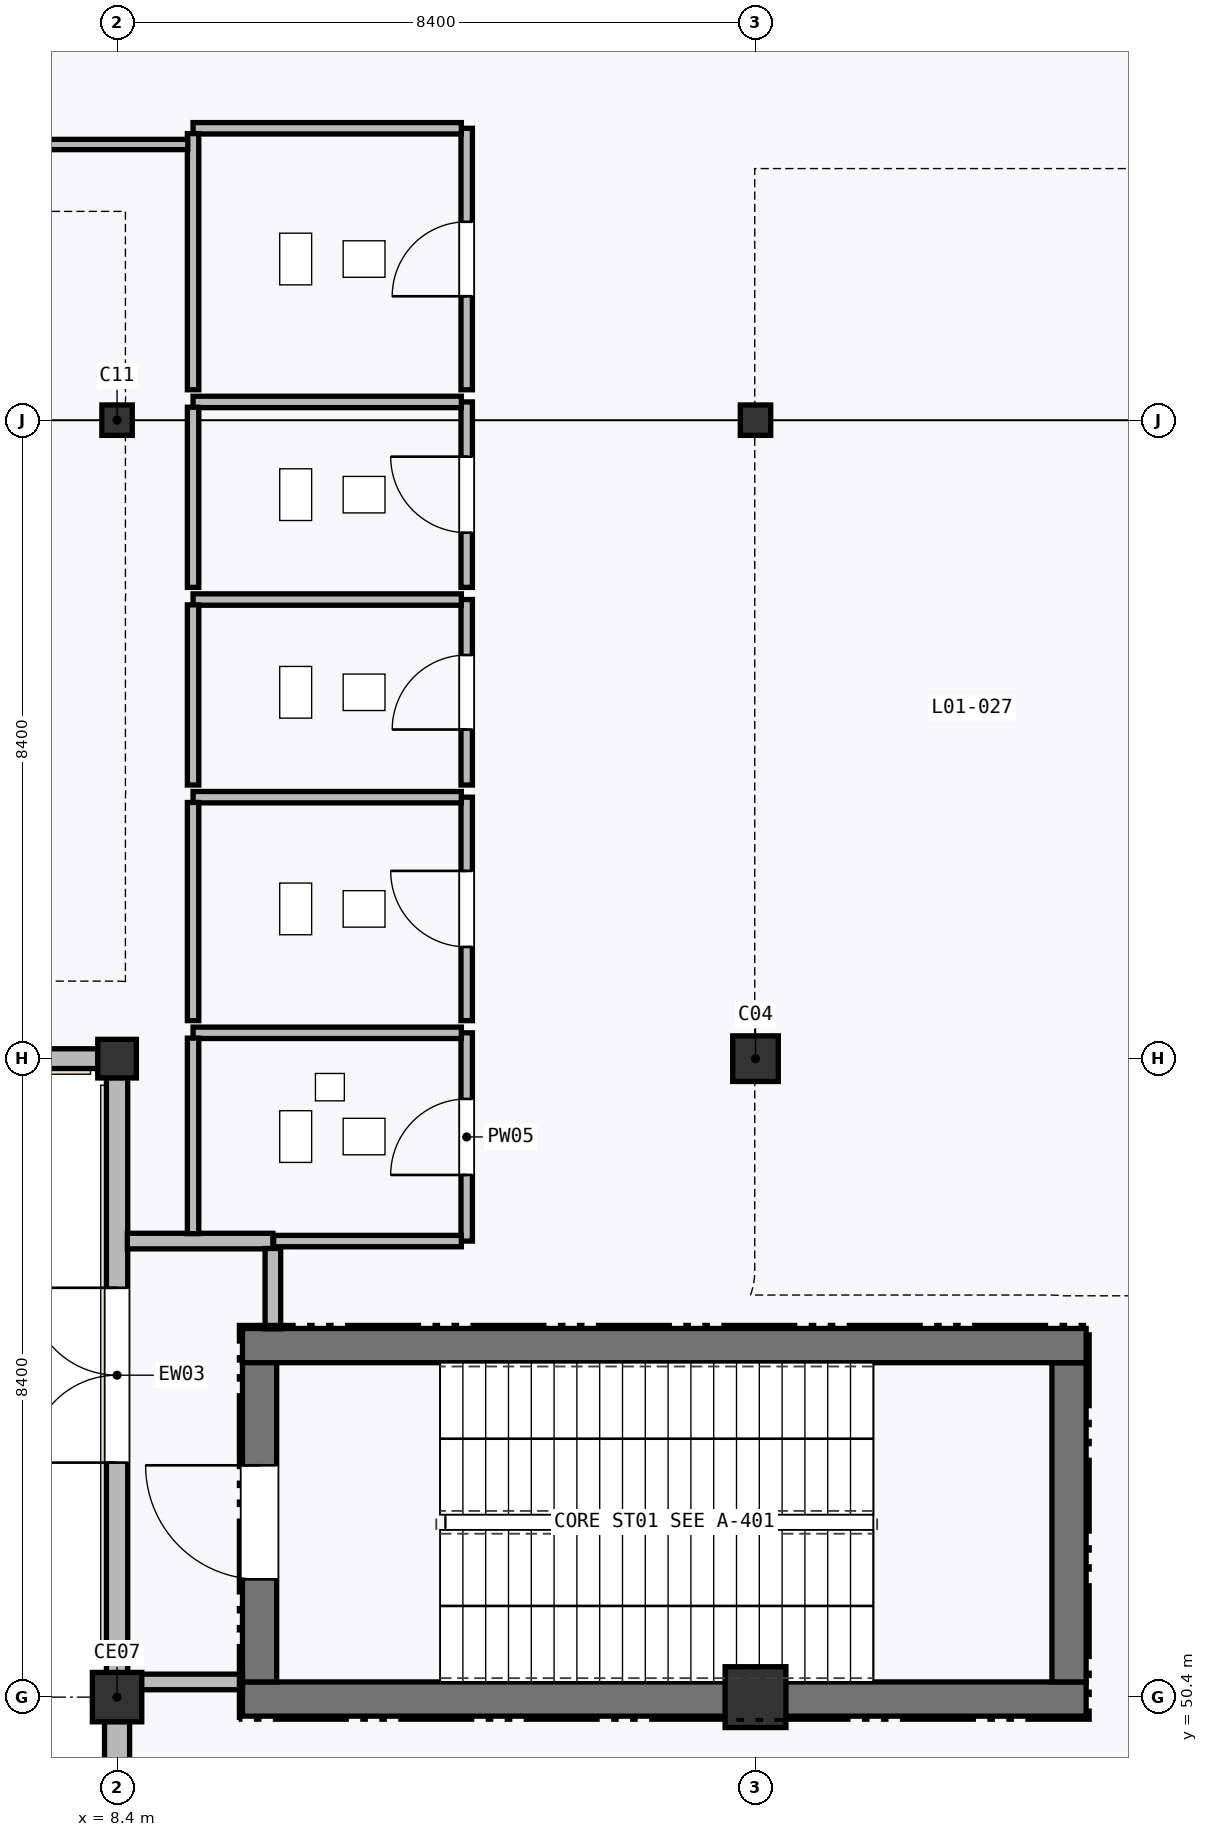
"""IFC4 building model, lengths in metres.
Left out: names, types, materials, properties, quantities, classifications, styles, units other than length and angle.
Written with IfcOpenShell. Run it as: python <this file> out.ifc"""

import sys

from ifc_helpers import new_model, si_unit, direction, frame, frame_2d, origin, origin_2d, place, context, subcontext, project, spatial, rectangle, hollow_rectangle, hollow_circle, i_section, extrude, element, fill, save


model = new_model("IFC4")
c1 = context("Model", 3, precision=1e-05, world=origin(), true_north=direction((0.0, 1.0)))
c2 = subcontext(c1, "Body", "Model", "MODEL_VIEW")
j1 = project(units=[si_unit("LENGTHUNIT", "METRE"), si_unit("PLANEANGLEUNIT", "RADIAN")], contexts=[c1])
p1 = place(None, origin())
s1 = spatial("IfcSite", under=j1, at=p1, CompositionType="ELEMENT")
p2 = place(p1, origin())
s2 = spatial("IfcBuilding", under=s1, at=p2, CompositionType="ELEMENT")
p3 = place(p2, origin())
s3 = spatial("IfcBuildingStorey", under=s2, at=p3, CompositionType="ELEMENT", Elevation=0.0)
p4 = place(p3, frame((8.4, 50.4, 0.0), z_axis=(0.0, 0.0, 1.0), x_axis=(1.0, 0.0, 0.0)))
e1 = element("IfcColumn", 1, at=p4, inside=s3, PredefinedType="COLUMN", context=c2, shape_type="SweptSolid", body=[
    extrude(rectangle(XDim=0.65, YDim=0.65, at=origin_2d()), origin(), (0.0, 0.0, 1.0), 6.0),
])
p5 = place(p3, frame((8.4, 58.8, 0.0), z_axis=(0.0, 0.0, 1.0), x_axis=(1.0, 0.0, 0.0)))
e2 = element("IfcColumn", 2, at=p5, inside=s3, PredefinedType="COLUMN", context=c2, shape_type="SweptSolid", body=[
    extrude(hollow_circle(Radius=0.254, WallThickness=0.016, at=origin_2d()), origin(), (0.0, 0.0, 1.0), 6.0),
])
p6 = place(p3, frame((8.4, 67.2, 0.0), z_axis=(0.0, 0.0, 1.0), x_axis=(1.0, 0.0, 0.0)))
e3 = element("IfcColumn", 3, at=p6, inside=s3, PredefinedType="COLUMN", context=c2, shape_type="SweptSolid", body=[
    extrude(i_section(OverallWidth=0.4, OverallDepth=0.4, WebThickness=0.013, FlangeThickness=0.021, FilletRadius=0.022, at=origin_2d()), origin(), (0.0, 0.0, 1.0), 6.0),
])
p7 = place(p3, frame((16.8, 50.4, 0.0), z_axis=(0.0, 0.0, 1.0), x_axis=(1.0, 0.0, 0.0)))
e4 = element("IfcColumn", 4, at=p7, inside=s3, PredefinedType="COLUMN", context=c2, shape_type="SweptSolid", body=[
    extrude(rectangle(XDim=0.8, YDim=0.8, at=origin_2d()), origin(), (0.0, 0.0, 1.0), 6.0),
])
p8 = place(p3, frame((16.8, 58.8, 0.0), z_axis=(0.0, 0.0, 1.0), x_axis=(1.0, 0.0, 0.0)))
e5 = element("IfcColumn", 5, at=p8, inside=s3, PredefinedType="COLUMN", context=c2, shape_type="SweptSolid", body=[
    extrude(hollow_rectangle(XDim=0.6, YDim=0.6, WallThickness=0.024, at=origin_2d()), origin(), (0.0, 0.0, 1.0), 6.0),
])
p9 = place(p3, frame((16.8, 67.2, 0.0), z_axis=(0.0, 0.0, 1.0), x_axis=(1.0, 0.0, 0.0)))
e6 = element("IfcColumn", 6, at=p9, inside=s3, PredefinedType="COLUMN", context=c2, shape_type="SweptSolid", body=[
    extrude(i_section(OverallWidth=0.4, OverallDepth=0.4, WebThickness=0.013, FlangeThickness=0.021, FilletRadius=0.022, at=origin_2d()), origin(), (0.0, 0.0, 1.0), 6.0),
])
p10 = place(p3, frame((0.0, 58.8, 0.0), z_axis=(0.0, 0.0, 1.0), x_axis=(1.0, 0.0, 0.0)))
e7 = element("IfcWall", 7, at=p10, inside=s3, PredefinedType="STANDARD", context=c2, shape_type="SweptSolid", body=[
    extrude(rectangle(XDim=8.151, YDim=0.26, at=frame_2d((4.075, 0.0))), origin(), (0.0, 0.0, 1.0), 5.231),
])
p11 = place(p10, frame((2.926, 0.0, 0.0)))
e8 = element("IfcOpeningElement", 8, at=p11, cuts=e7, PredefinedType="OPENING", context=c2, shape_type="SweptSolid", body=[
    extrude(rectangle(XDim=2.3, YDim=2.4, at=frame_2d((1.15, 1.2))), frame((0.0, 0.14, 0.0), z_axis=(0.0, -1.0, 0.0), x_axis=(1.0, 0.0, 0.0)), (0.0, 0.0, 1.0), 0.28),
])
p12 = place(p3, frame((8.4, 58.551, 0.0), z_axis=(0.0, 0.0, 1.0), x_axis=(0.0, -1.0, 0.0)))
e9 = element("IfcWall", 9, at=p12, inside=s3, PredefinedType="STANDARD", context=c2, shape_type="SweptSolid", body=[
    extrude(rectangle(XDim=7.831, YDim=0.28, at=frame_2d((3.916, 0.0))), origin(), (0.0, 0.0, 1.0), 5.231),
])
p13 = place(p12, frame((2.765, 0.0, 0.0)))
e10 = element("IfcOpeningElement", 10, at=p13, cuts=e9, PredefinedType="OPENING", context=c2, shape_type="SweptSolid", body=[
    extrude(rectangle(XDim=2.3, YDim=2.4, at=frame_2d((1.15, 1.2))), frame((0.0, 0.15, 0.0), z_axis=(0.0, -1.0, 0.0), x_axis=(1.0, 0.0, 0.0)), (0.0, 0.0, 1.0), 0.3),
])
p14 = place(p3, frame((8.4, 50.08, 0.0), z_axis=(0.0, 0.0, 1.0), x_axis=(0.0, -1.0, 0.0)))
e11 = element("IfcWall", 11, at=p14, inside=s3, PredefinedType="STANDARD", context=c2, shape_type="SweptSolid", body=[
    extrude(rectangle(XDim=7.735, YDim=0.33, at=frame_2d((3.868, 0.0))), origin(), (0.0, 0.0, 1.0), 5.231),
])
p15 = place(p14, frame((2.08, 0.0, 0.0)))
e12 = element("IfcOpeningElement", 12, at=p15, cuts=e11, PredefinedType="OPENING", context=c2, shape_type="SweptSolid", body=[
    extrude(rectangle(XDim=4.8, YDim=3.4, at=frame_2d((2.4, 1.7))), frame((0.0, 0.175, 0.0), z_axis=(0.0, -1.0, 0.0), x_axis=(1.0, 0.0, 0.0)), (0.0, 0.0, 1.0), 0.35),
])
p16 = place(p3, frame((10.05, 50.375, 0.0), z_axis=(0.0, 0.0, 1.0), x_axis=(1.0, 0.0, 0.0)))
e13 = element("IfcWall", 13, at=p16, inside=s3, PredefinedType="SHEAR", context=c2, shape_type="SweptSolid", body=[
    extrude(rectangle(XDim=11.1, YDim=0.45, at=frame_2d((5.55, 0.0))), origin(), (0.0, 0.0, 1.0), 5.745),
])
p17 = place(p3, frame((20.925, 50.6, 0.0), z_axis=(0.0, 0.0, 1.0), x_axis=(0.0, 1.0, 0.0)))
e14 = element("IfcWall", 14, at=p17, inside=s3, PredefinedType="SHEAR", context=c2, shape_type="SweptSolid", body=[
    extrude(rectangle(XDim=4.2, YDim=0.45, at=frame_2d((2.1, 0.0))), origin(), (0.0, 0.0, 1.0), 5.745),
])
p18 = place(p3, frame((21.15, 55.025, 0.0), z_axis=(0.0, 0.0, 1.0), x_axis=(-1.0, 0.0, 0.0)))
e15 = element("IfcWall", 15, at=p18, inside=s3, PredefinedType="SHEAR", context=c2, shape_type="SweptSolid", body=[
    extrude(rectangle(XDim=11.1, YDim=0.45, at=frame_2d((5.55, 0.0))), origin(), (0.0, 0.0, 1.0), 5.745),
])
p19 = place(p3, frame((10.275, 54.8, 0.0), z_axis=(0.0, 0.0, 1.0), x_axis=(0.0, -1.0, 0.0)))
e16 = element("IfcWall", 16, at=p19, inside=s3, PredefinedType="SHEAR", context=c2, shape_type="SweptSolid", body=[
    extrude(rectangle(XDim=4.2, YDim=0.45, at=frame_2d((2.1, 0.0))), origin(), (0.0, 0.0, 1.0), 5.745),
])
p20 = place(p19, frame((1.35, 0.0, 0.0)))
e17 = element("IfcOpeningElement", 17, at=p20, cuts=e16, PredefinedType="OPENING", context=c2, shape_type="SweptSolid", body=[
    extrude(rectangle(XDim=1.5, YDim=2.15, at=frame_2d((0.75, 1.075))), frame((0.0, 0.235, 0.0), z_axis=(0.0, -1.0, 0.0), x_axis=(1.0, 0.0, 0.0)), (0.0, 0.0, 1.0), 0.47),
])
p21 = place(p3, frame((10.45, 56.4, 0.0), z_axis=(0.0, 0.0, 1.0), x_axis=(-1.0, 0.0, 0.0)))
e18 = element("IfcWall", 18, at=p21, inside=s3, PredefinedType="PARTITIONING", context=c2, shape_type="SweptSolid", body=[
    extrude(rectangle(XDim=1.915, YDim=0.205, at=frame_2d((0.958, 0.0))), origin(), (0.0, 0.0, 1.0), 5.745),
])
p22 = place(p3, frame((8.32, 50.6, 0.0), z_axis=(0.0, 0.0, 1.0), x_axis=(1.0, 0.0, 0.0)))
e19 = element("IfcWall", 19, at=p22, inside=s3, PredefinedType="PARTITIONING", context=c2, shape_type="SweptSolid", body=[
    extrude(rectangle(XDim=1.73, YDim=0.205, at=frame_2d((0.865, 0.0))), origin(), (0.0, 0.0, 1.0), 5.143),
])
p23 = place(p3, frame((10.45, 55.245, 0.0), z_axis=(0.0, 0.0, 1.0), x_axis=(0.0, 1.0, 0.0)))
e20 = element("IfcWall", 20, at=p23, inside=s3, PredefinedType="PARTITIONING", context=c2, shape_type="SweptSolid", body=[
    extrude(rectangle(XDim=1.057, YDim=0.205, at=frame_2d((0.529, 0.0))), origin(), (0.0, 0.0, 1.0), 5.745),
])
p24 = place(p3, frame((13.0, 56.4, 0.0), z_axis=(0.0, 0.0, 1.0), x_axis=(0.0, 1.0, 0.0)))
e21 = element("IfcWall", 21, at=p24, inside=s3, PredefinedType="PARTITIONING", context=c2, shape_type="SweptSolid", body=[
    extrude(rectangle(XDim=2.74, YDim=0.15, at=frame_2d((1.37, 0.0))), origin(), (0.0, 0.0, 1.0), 5.745),
])
p25 = place(p24, frame((0.87, 0.0, 0.0)))
e22 = element("IfcOpeningElement", 22, at=p25, cuts=e21, PredefinedType="OPENING", context=c2, shape_type="SweptSolid", body=[
    extrude(rectangle(XDim=1.0, YDim=2.1, at=frame_2d((0.5, 1.05))), frame((0.0, 0.085, 0.0), z_axis=(0.0, -1.0, 0.0), x_axis=(1.0, 0.0, 0.0)), (0.0, 0.0, 1.0), 0.17),
])
p26 = place(p3, frame((10.46, 56.4, 0.0), z_axis=(0.0, 0.0, 1.0), x_axis=(1.0, 0.0, 0.0)))
e23 = element("IfcWall", 23, at=p26, inside=s3, PredefinedType="PARTITIONING", context=c2, shape_type="SweptSolid", body=[
    extrude(rectangle(XDim=2.47, YDim=0.15, at=frame_2d((1.235, 0.0))), origin(), (0.0, 0.0, 1.0), 5.745),
])
p27 = place(p3, frame((12.93, 59.14, 0.0), z_axis=(0.0, 0.0, 1.0), x_axis=(-1.0, 0.0, 0.0)))
e24 = element("IfcWall", 24, at=p27, inside=s3, PredefinedType="PARTITIONING", context=c2, shape_type="SweptSolid", body=[
    extrude(rectangle(XDim=3.53, YDim=0.15, at=frame_2d((1.765, 0.0))), origin(), (0.0, 0.0, 1.0), 4.825),
])
p28 = place(p3, frame((9.4, 59.07, 0.0), z_axis=(0.0, 0.0, 1.0), x_axis=(0.0, -1.0, 0.0)))
e25 = element("IfcWall", 25, at=p28, inside=s3, PredefinedType="PARTITIONING", context=c2, shape_type="SweptSolid", body=[
    extrude(rectangle(XDim=2.573, YDim=0.15, at=frame_2d((1.286, 0.0))), origin(), (0.0, 0.0, 1.0), 5.745),
])
p29 = place(p3, frame((13.0, 59.3, 0.0), z_axis=(0.0, 0.0, 1.0), x_axis=(0.0, 1.0, 0.0)))
e26 = element("IfcWall", 26, at=p29, inside=s3, PredefinedType="PARTITIONING", context=c2, shape_type="SweptSolid", body=[
    extrude(rectangle(XDim=2.94, YDim=0.15, at=frame_2d((1.47, 0.0))), origin(), (0.0, 0.0, 1.0), 5.745),
])
p30 = place(p29, frame((0.97, 0.0, 0.0)))
e27 = element("IfcOpeningElement", 27, at=p30, cuts=e26, PredefinedType="OPENING", context=c2, shape_type="SweptSolid", body=[
    extrude(rectangle(XDim=1.0, YDim=2.1, at=frame_2d((0.5, 1.05))), frame((0.0, 0.085, 0.0), z_axis=(0.0, -1.0, 0.0), x_axis=(1.0, 0.0, 0.0)), (0.0, 0.0, 1.0), 0.17),
])
p31 = place(p3, frame((12.93, 62.24, 0.0), z_axis=(0.0, 0.0, 1.0), x_axis=(-1.0, 0.0, 0.0)))
e28 = element("IfcWall", 28, at=p31, inside=s3, PredefinedType="PARTITIONING", context=c2, shape_type="SweptSolid", body=[
    extrude(rectangle(XDim=3.53, YDim=0.15, at=frame_2d((1.765, 0.0))), origin(), (0.0, 0.0, 1.0), 5.745),
])
p32 = place(p3, frame((9.4, 62.17, 0.0), z_axis=(0.0, 0.0, 1.0), x_axis=(0.0, -1.0, 0.0)))
e29 = element("IfcWall", 29, at=p32, inside=s3, PredefinedType="PARTITIONING", context=c2, shape_type="SweptSolid", body=[
    extrude(rectangle(XDim=2.87, YDim=0.15, at=frame_2d((1.435, 0.0))), origin(), (0.0, 0.0, 1.0), 5.745),
])
p33 = place(p3, frame((13.0, 62.4, 0.0), z_axis=(0.0, 0.0, 1.0), x_axis=(0.0, 1.0, 0.0)))
e30 = element("IfcWall", 30, at=p33, inside=s3, PredefinedType="PARTITIONING", context=c2, shape_type="SweptSolid", body=[
    extrude(rectangle(XDim=2.44, YDim=0.15, at=frame_2d((1.22, 0.0))), origin(), (0.0, 0.0, 1.0), 5.745),
])
p34 = place(p33, frame((0.73, 0.0, 0.0)))
e31 = element("IfcOpeningElement", 31, at=p34, cuts=e30, PredefinedType="OPENING", context=c2, shape_type="SweptSolid", body=[
    extrude(rectangle(XDim=0.98, YDim=2.1, at=frame_2d((0.49, 1.05))), frame((0.0, 0.085, 0.0), z_axis=(0.0, -1.0, 0.0), x_axis=(1.0, 0.0, 0.0)), (0.0, 0.0, 1.0), 0.17),
])
p35 = place(p3, frame((12.93, 64.84, 0.0), z_axis=(0.0, 0.0, 1.0), x_axis=(-1.0, 0.0, 0.0)))
e32 = element("IfcWall", 32, at=p35, inside=s3, PredefinedType="PARTITIONING", context=c2, shape_type="SweptSolid", body=[
    extrude(rectangle(XDim=3.53, YDim=0.15, at=frame_2d((1.765, 0.0))), origin(), (0.0, 0.0, 1.0), 5.745),
])
p36 = place(p3, frame((9.4, 64.77, 0.0), z_axis=(0.0, 0.0, 1.0), x_axis=(0.0, -1.0, 0.0)))
e33 = element("IfcWall", 33, at=p36, inside=s3, PredefinedType="PARTITIONING", context=c2, shape_type="SweptSolid", body=[
    extrude(rectangle(XDim=2.37, YDim=0.15, at=frame_2d((1.185, 0.0))), origin(), (0.0, 0.0, 1.0), 5.745),
])
p37 = place(p3, frame((13.0, 65.0, 0.0), z_axis=(0.0, 0.0, 1.0), x_axis=(0.0, 1.0, 0.0)))
e34 = element("IfcWall", 34, at=p37, inside=s3, PredefinedType="PARTITIONING", context=c2, shape_type="SweptSolid", body=[
    extrude(rectangle(XDim=2.44, YDim=0.15, at=frame_2d((1.22, 0.0))), origin(), (0.0, 0.0, 1.0), 5.745),
])
p38 = place(p37, frame((0.72, 0.0, 0.0)))
e35 = element("IfcOpeningElement", 35, at=p38, cuts=e34, PredefinedType="OPENING", context=c2, shape_type="SweptSolid", body=[
    extrude(rectangle(XDim=1.0, YDim=2.1, at=frame_2d((0.5, 1.05))), frame((0.0, 0.085, 0.0), z_axis=(0.0, -1.0, 0.0), x_axis=(1.0, 0.0, 0.0)), (0.0, 0.0, 1.0), 0.17),
])
p39 = place(p3, frame((12.93, 67.44, 0.0), z_axis=(0.0, 0.0, 1.0), x_axis=(-1.0, 0.0, 0.0)))
e36 = element("IfcWall", 36, at=p39, inside=s3, PredefinedType="PARTITIONING", context=c2, shape_type="SweptSolid", body=[
    extrude(rectangle(XDim=3.53, YDim=0.15, at=frame_2d((1.765, 0.0))), origin(), (0.0, 0.0, 1.0), 5.143),
])
p40 = place(p3, frame((9.4, 67.37, 0.0), z_axis=(0.0, 0.0, 1.0), x_axis=(0.0, -1.0, 0.0)))
e37 = element("IfcWall", 37, at=p40, inside=s3, PredefinedType="PARTITIONING", context=c2, shape_type="SweptSolid", body=[
    extrude(rectangle(XDim=2.37, YDim=0.15, at=frame_2d((1.185, 0.0))), origin(), (0.0, 0.0, 1.0), 5.745),
])
p41 = place(p3, frame((13.0, 67.6, 0.0), z_axis=(0.0, 0.0, 1.0), x_axis=(0.0, 1.0, 0.0)))
e38 = element("IfcWall", 38, at=p41, inside=s3, PredefinedType="PARTITIONING", context=c2, shape_type="SweptSolid", body=[
    extrude(rectangle(XDim=3.44, YDim=0.15, at=frame_2d((1.72, 0.0))), origin(), (0.0, 0.0, 1.0), 5.745),
])
p42 = place(p41, frame((1.23, 0.0, 0.0)))
e39 = element("IfcOpeningElement", 39, at=p42, cuts=e38, PredefinedType="OPENING", context=c2, shape_type="SweptSolid", body=[
    extrude(rectangle(XDim=0.98, YDim=2.1, at=frame_2d((0.49, 1.05))), frame((0.0, 0.085, 0.0), z_axis=(0.0, -1.0, 0.0), x_axis=(1.0, 0.0, 0.0)), (0.0, 0.0, 1.0), 0.17),
])
p43 = place(p3, frame((12.93, 71.04, 0.0), z_axis=(0.0, 0.0, 1.0), x_axis=(-1.0, 0.0, 0.0)))
e40 = element("IfcWall", 40, at=p43, inside=s3, PredefinedType="PARTITIONING", context=c2, shape_type="SweptSolid", body=[
    extrude(rectangle(XDim=3.53, YDim=0.15, at=frame_2d((1.765, 0.0))), origin(), (0.0, 0.0, 1.0), 5.745),
])
p44 = place(p3, frame((9.4, 70.97, 0.0), z_axis=(0.0, 0.0, 1.0), x_axis=(0.0, -1.0, 0.0)))
e41 = element("IfcWall", 41, at=p44, inside=s3, PredefinedType="PARTITIONING", context=c2, shape_type="SweptSolid", body=[
    extrude(rectangle(XDim=3.37, YDim=0.15, at=frame_2d((1.685, 0.0))), origin(), (0.0, 0.0, 1.0), 5.745),
])
p45 = place(p3, frame((9.33, 70.827, 0.0), z_axis=(0.0, 0.0, 1.0), x_axis=(-1.0, 0.0, 0.0)))
e42 = element("IfcWall", 42, at=p45, inside=s3, PredefinedType="PARTITIONING", context=c2, shape_type="SweptSolid", body=[
    extrude(rectangle(XDim=9.215, YDim=0.135, at=frame_2d((4.607, 0.0))), origin(), (0.0, 0.0, 1.0), 5.745),
])
p46 = place(p13, frame((2.3, 0.0, 0.0), z_axis=(0.0, 0.0, 1.0), x_axis=(-1.0, 0.0, 0.0)))
e43 = element("IfcDoor", 43, at=p46, inside=s3, OperationType="DOUBLE_DOOR_SINGLE_SWING", PredefinedType="DOOR", context=c2, shape_type="SweptSolid", body=[
    extrude(rectangle(XDim=2.3, YDim=2.4, at=frame_2d((1.15, 1.2))), frame((0.0, 0.025, 0.0), z_axis=(0.0, -1.0, 0.0), x_axis=(1.0, 0.0, 0.0)), (0.0, 0.0, 1.0), 0.05),
])
fill(e10, e43)
p47 = place(p20, frame((1.5, 0.0, 0.0), z_axis=(0.0, 0.0, 1.0), x_axis=(-1.0, 0.0, 0.0)))
e44 = element("IfcDoor", 44, at=p47, inside=s3, OperationType="SINGLE_SWING_LEFT", PredefinedType="DOOR", context=c2, shape_type="SweptSolid", body=[
    extrude(rectangle(XDim=1.5, YDim=2.15, at=frame_2d((0.75, 1.075))), frame((0.0, 0.025, 0.0), z_axis=(0.0, -1.0, 0.0), x_axis=(1.0, 0.0, 0.0)), (0.0, 0.0, 1.0), 0.05),
])
fill(e17, e44)
p48 = place(p25, origin())
e45 = element("IfcDoor", 45, at=p48, inside=s3, OperationType="SINGLE_SWING_LEFT", PredefinedType="DOOR", context=c2, shape_type="SweptSolid", body=[
    extrude(rectangle(XDim=1.0, YDim=2.1, at=frame_2d((0.5, 1.05))), frame((0.0, 0.025, 0.0), z_axis=(0.0, -1.0, 0.0), x_axis=(1.0, 0.0, 0.0)), (0.0, 0.0, 1.0), 0.05),
])
fill(e22, e45)
p49 = place(p30, origin())
e46 = element("IfcDoor", 46, at=p49, inside=s3, OperationType="SINGLE_SWING_RIGHT", PredefinedType="DOOR", context=c2, shape_type="SweptSolid", body=[
    extrude(rectangle(XDim=1.0, YDim=2.1, at=frame_2d((0.5, 1.05))), frame((0.0, 0.025, 0.0), z_axis=(0.0, -1.0, 0.0), x_axis=(1.0, 0.0, 0.0)), (0.0, 0.0, 1.0), 0.05),
])
fill(e27, e46)
p50 = place(p34, origin())
e47 = element("IfcDoor", 47, at=p50, inside=s3, OperationType="SINGLE_SWING_LEFT", PredefinedType="DOOR", context=c2, shape_type="SweptSolid", body=[
    extrude(rectangle(XDim=0.98, YDim=2.1, at=frame_2d((0.49, 1.05))), frame((0.0, 0.025, 0.0), z_axis=(0.0, -1.0, 0.0), x_axis=(1.0, 0.0, 0.0)), (0.0, 0.0, 1.0), 0.05),
])
fill(e31, e47)
p51 = place(p38, origin())
e48 = element("IfcDoor", 48, at=p51, inside=s3, OperationType="SINGLE_SWING_RIGHT", PredefinedType="DOOR", context=c2, shape_type="SweptSolid", body=[
    extrude(rectangle(XDim=1.0, YDim=2.1, at=frame_2d((0.5, 1.05))), frame((0.0, 0.025, 0.0), z_axis=(0.0, -1.0, 0.0), x_axis=(1.0, 0.0, 0.0)), (0.0, 0.0, 1.0), 0.05),
])
fill(e35, e48)
p52 = place(p42, origin())
e49 = element("IfcDoor", 49, at=p52, inside=s3, OperationType="SINGLE_SWING_LEFT", PredefinedType="DOOR", context=c2, shape_type="SweptSolid", body=[
    extrude(rectangle(XDim=0.98, YDim=2.1, at=frame_2d((0.49, 1.05))), frame((0.0, 0.025, 0.0), z_axis=(0.0, -1.0, 0.0), x_axis=(1.0, 0.0, 0.0)), (0.0, 0.0, 1.0), 0.05),
])
fill(e39, e49)
save(model, sys.argv[1])
